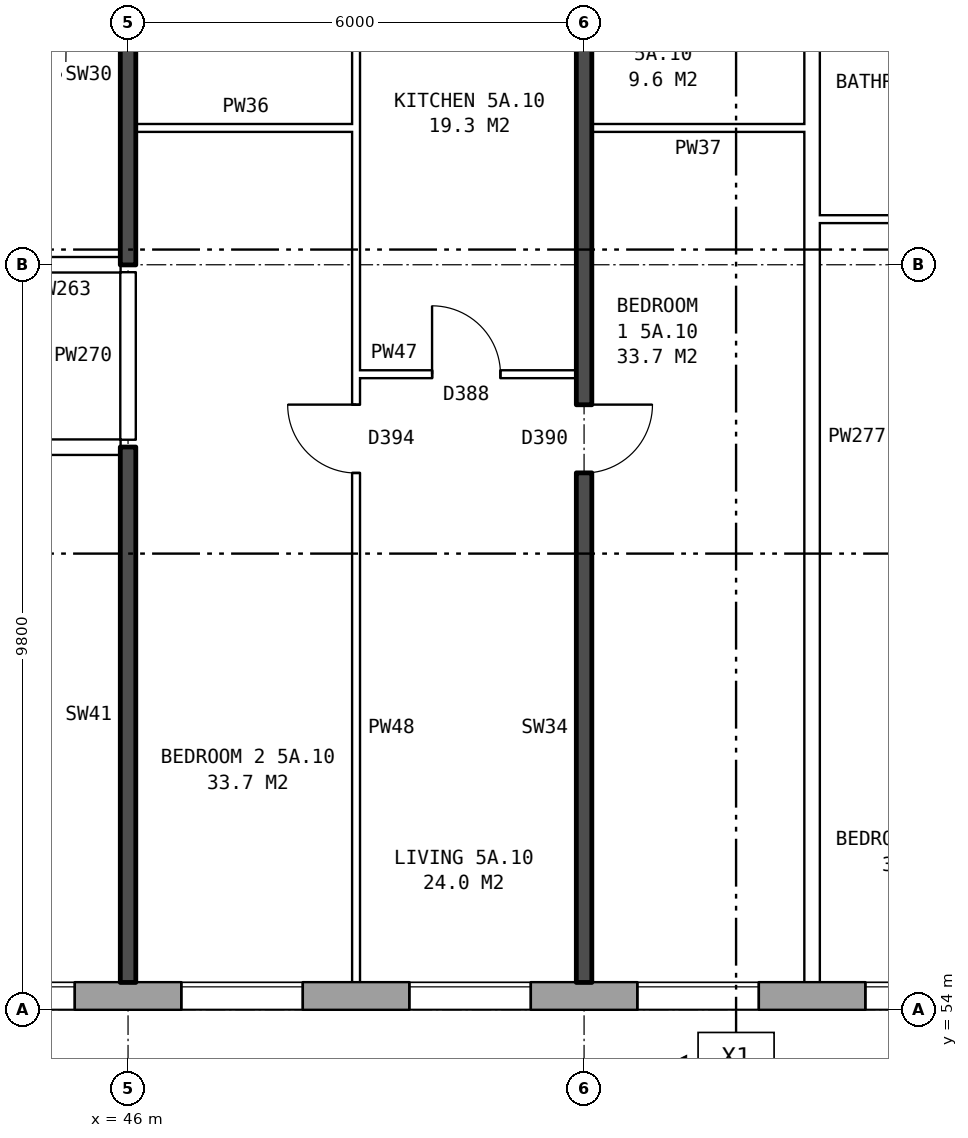
"""IFC4 building model, lengths in metres.
Left out: names, types, materials, properties, quantities, classifications, styles, units other than length and angle.
Written with IfcOpenShell. Run it as: python <this file> out.ifc"""

import sys

from ifc_helpers import new_model, si_unit, direction, frame, frame_2d, origin, place, context, subcontext, project, spatial, rectangle, extrude, element, fill, save


model = new_model("IFC4")
c1 = context("Model", 3, precision=1e-05, world=origin(), true_north=direction((0.0, 1.0)))
c2 = subcontext(c1, "Body", "Model", "MODEL_VIEW")
j1 = project(units=[si_unit("LENGTHUNIT", "METRE"), si_unit("PLANEANGLEUNIT", "RADIAN")], contexts=[c1])
p1 = place(None, origin())
s1 = spatial("IfcSite", under=j1, at=p1, CompositionType="ELEMENT")
p2 = place(p1, origin())
s2 = spatial("IfcBuilding", under=s1, at=p2, CompositionType="ELEMENT")
p3 = place(p2, frame((0.0, 0.0, 22.6)))
s3 = spatial("IfcBuildingStorey", under=s2, at=p3, CompositionType="ELEMENT", Elevation=22.6)
p4 = place(p3, frame((22.825, 54.18, 0.0), z_axis=(0.0, 0.0, 1.0), x_axis=(1.0, 0.0, 0.0)))
e1 = element("IfcWall", 1, at=p4, inside=s3, PredefinedType="STANDARD", context=c2, shape_type="SweptSolid", body=[
    extrude(rectangle(XDim=50.101, YDim=0.36, at=frame_2d((25.05, 0.0))), origin(), (0.0, 0.0, 1.0), 2.85),
])
p5 = place(p4, frame((0.3, 0.0, 0.8)))
e2 = element("IfcOpeningElement", 2, at=p5, cuts=e1, PredefinedType="OPENING", context=c2, shape_type="SweptSolid", body=[
    extrude(rectangle(XDim=1.4, YDim=1.8, at=frame_2d((0.7, 0.9))), frame((0.0, 0.19, 0.0), z_axis=(0.0, -1.0, 0.0), x_axis=(1.0, 0.0, 0.0)), (0.0, 0.0, 1.0), 0.38),
])
p6 = place(p4, frame((5.475, 0.0, 0.8)))
e3 = element("IfcOpeningElement", 3, at=p6, cuts=e1, PredefinedType="OPENING", context=c2, shape_type="SweptSolid", body=[
    extrude(rectangle(XDim=1.2, YDim=0.9, at=frame_2d((0.6, 0.45))), frame((0.0, 0.19, 0.0), z_axis=(0.0, -1.0, 0.0), x_axis=(1.0, 0.0, 0.0)), (0.0, 0.0, 1.0), 0.38),
])
p7 = place(p4, frame((8.875, 0.0, 0.8)))
e4 = element("IfcOpeningElement", 4, at=p7, cuts=e1, PredefinedType="OPENING", context=c2, shape_type="SweptSolid", body=[
    extrude(rectangle(XDim=1.6, YDim=1.8, at=frame_2d((0.8, 0.9))), frame((0.0, 0.19, 0.0), z_axis=(0.0, -1.0, 0.0), x_axis=(1.0, 0.0, 0.0)), (0.0, 0.0, 1.0), 0.38),
])
p8 = place(p4, frame((11.875, 0.0, 0.8)))
e5 = element("IfcOpeningElement", 5, at=p8, cuts=e1, PredefinedType="OPENING", context=c2, shape_type="SweptSolid", body=[
    extrude(rectangle(XDim=1.6, YDim=1.8, at=frame_2d((0.8, 0.9))), frame((0.0, 0.19, 0.0), z_axis=(0.0, -1.0, 0.0), x_axis=(1.0, 0.0, 0.0)), (0.0, 0.0, 1.0), 0.38),
])
p9 = place(p4, frame((14.875, 0.0, 0.8)))
e6 = element("IfcOpeningElement", 6, at=p9, cuts=e1, PredefinedType="OPENING", context=c2, shape_type="SweptSolid", body=[
    extrude(rectangle(XDim=1.6, YDim=1.8, at=frame_2d((0.8, 0.9))), frame((0.0, 0.19, 0.0), z_axis=(0.0, -1.0, 0.0), x_axis=(1.0, 0.0, 0.0)), (0.0, 0.0, 1.0), 0.38),
])
p10 = place(p4, frame((17.875, 0.0, 0.8)))
e7 = element("IfcOpeningElement", 7, at=p10, cuts=e1, PredefinedType="OPENING", context=c2, shape_type="SweptSolid", body=[
    extrude(rectangle(XDim=1.6, YDim=1.8, at=frame_2d((0.8, 0.9))), frame((0.0, 0.19, 0.0), z_axis=(0.0, -1.0, 0.0), x_axis=(1.0, 0.0, 0.0)), (0.0, 0.0, 1.0), 0.38),
])
p11 = place(p4, frame((20.875, 0.0, 0.8)))
e8 = element("IfcOpeningElement", 8, at=p11, cuts=e1, PredefinedType="OPENING", context=c2, shape_type="SweptSolid", body=[
    extrude(rectangle(XDim=1.6, YDim=1.8, at=frame_2d((0.8, 0.9))), frame((0.0, 0.19, 0.0), z_axis=(0.0, -1.0, 0.0), x_axis=(1.0, 0.0, 0.0)), (0.0, 0.0, 1.0), 0.38),
])
p12 = place(p4, frame((23.875, 0.0, 0.8)))
e9 = element("IfcOpeningElement", 9, at=p12, cuts=e1, PredefinedType="OPENING", context=c2, shape_type="SweptSolid", body=[
    extrude(rectangle(XDim=1.6, YDim=1.8, at=frame_2d((0.8, 0.9))), frame((0.0, 0.19, 0.0), z_axis=(0.0, -1.0, 0.0), x_axis=(1.0, 0.0, 0.0)), (0.0, 0.0, 1.0), 0.38),
])
p13 = place(p4, frame((26.875, 0.0, 0.8)))
e10 = element("IfcOpeningElement", 10, at=p13, cuts=e1, PredefinedType="OPENING", context=c2, shape_type="SweptSolid", body=[
    extrude(rectangle(XDim=1.6, YDim=1.8, at=frame_2d((0.8, 0.9))), frame((0.0, 0.19, 0.0), z_axis=(0.0, -1.0, 0.0), x_axis=(1.0, 0.0, 0.0)), (0.0, 0.0, 1.0), 0.38),
])
p14 = place(p4, frame((29.875, 0.0, 0.8)))
e11 = element("IfcOpeningElement", 11, at=p14, cuts=e1, PredefinedType="OPENING", context=c2, shape_type="SweptSolid", body=[
    extrude(rectangle(XDim=1.6, YDim=1.8, at=frame_2d((0.8, 0.9))), frame((0.0, 0.19, 0.0), z_axis=(0.0, -1.0, 0.0), x_axis=(1.0, 0.0, 0.0)), (0.0, 0.0, 1.0), 0.38),
])
p15 = place(p4, frame((32.875, 0.0, 0.8)))
e12 = element("IfcOpeningElement", 12, at=p15, cuts=e1, PredefinedType="OPENING", context=c2, shape_type="SweptSolid", body=[
    extrude(rectangle(XDim=1.6, YDim=1.8, at=frame_2d((0.8, 0.9))), frame((0.0, 0.19, 0.0), z_axis=(0.0, -1.0, 0.0), x_axis=(1.0, 0.0, 0.0)), (0.0, 0.0, 1.0), 0.38),
])
p16 = place(p4, frame((35.875, 0.0, 0.8)))
e13 = element("IfcOpeningElement", 13, at=p16, cuts=e1, PredefinedType="OPENING", context=c2, shape_type="SweptSolid", body=[
    extrude(rectangle(XDim=1.6, YDim=1.8, at=frame_2d((0.8, 0.9))), frame((0.0, 0.19, 0.0), z_axis=(0.0, -1.0, 0.0), x_axis=(1.0, 0.0, 0.0)), (0.0, 0.0, 1.0), 0.38),
])
p17 = place(p4, frame((38.875, 0.0, 0.8)))
e14 = element("IfcOpeningElement", 14, at=p17, cuts=e1, PredefinedType="OPENING", context=c2, shape_type="SweptSolid", body=[
    extrude(rectangle(XDim=1.6, YDim=1.8, at=frame_2d((0.8, 0.9))), frame((0.0, 0.19, 0.0), z_axis=(0.0, -1.0, 0.0), x_axis=(1.0, 0.0, 0.0)), (0.0, 0.0, 1.0), 0.38),
])
p18 = place(p4, frame((41.875, 0.0, 0.8)))
e15 = element("IfcOpeningElement", 15, at=p18, cuts=e1, PredefinedType="OPENING", context=c2, shape_type="SweptSolid", body=[
    extrude(rectangle(XDim=1.6, YDim=1.8, at=frame_2d((0.8, 0.9))), frame((0.0, 0.19, 0.0), z_axis=(0.0, -1.0, 0.0), x_axis=(1.0, 0.0, 0.0)), (0.0, 0.0, 1.0), 0.38),
])
p19 = place(p4, frame((43.775, 0.0, 0.8)))
e16 = element("IfcOpeningElement", 16, at=p19, cuts=e1, PredefinedType="OPENING", context=c2, shape_type="SweptSolid", body=[
    extrude(rectangle(XDim=0.8, YDim=0.9, at=frame_2d((0.4, 0.45))), frame((0.0, 0.19, 0.0), z_axis=(0.0, -1.0, 0.0), x_axis=(1.0, 0.0, 0.0)), (0.0, 0.0, 1.0), 0.38),
])
p20 = place(p4, frame((47.875, 0.0, 0.8)))
e17 = element("IfcOpeningElement", 17, at=p20, cuts=e1, PredefinedType="OPENING", context=c2, shape_type="SweptSolid", body=[
    extrude(rectangle(XDim=1.6, YDim=1.8, at=frame_2d((0.8, 0.9))), frame((0.0, 0.19, 0.0), z_axis=(0.0, -1.0, 0.0), x_axis=(1.0, 0.0, 0.0)), (0.0, 0.0, 1.0), 0.38),
])
p21 = place(p4, frame((2.0, 0.0, 0.9)))
e18 = element("IfcOpeningElement", 18, at=p21, cuts=e1, PredefinedType="OPENING", context=c2, shape_type="SweptSolid", body=[
    extrude(rectangle(XDim=0.8, YDim=1.5, at=frame_2d((0.4, 0.75))), frame((0.0, 0.19, 0.0), z_axis=(0.0, -1.0, 0.0), x_axis=(1.0, 0.0, 0.0)), (0.0, 0.0, 1.0), 0.38),
])
p22 = place(p4, frame((6.975, 0.0, 0.8)))
e19 = element("IfcOpeningElement", 19, at=p22, cuts=e1, PredefinedType="OPENING", context=c2, shape_type="SweptSolid", body=[
    extrude(rectangle(XDim=1.4, YDim=1.8, at=frame_2d((0.7, 0.9))), frame((0.0, 0.19, 0.0), z_axis=(0.0, -1.0, 0.0), x_axis=(1.0, 0.0, 0.0)), (0.0, 0.0, 1.0), 0.38),
])
p23 = place(p4, frame((46.075, 0.0, 1.7)))
e20 = element("IfcOpeningElement", 20, at=p23, cuts=e1, PredefinedType="OPENING", context=c2, shape_type="SweptSolid", body=[
    extrude(rectangle(XDim=0.8, YDim=0.9, at=frame_2d((0.4, 0.45))), frame((0.0, 0.19, 0.0), z_axis=(0.0, -1.0, 0.0), x_axis=(1.0, 0.0, 0.0)), (0.0, 0.0, 1.0), 0.38),
])
p24 = place(p3, frame((20.11, 61.4, 0.0), z_axis=(0.0, 0.0, 1.0), x_axis=(1.0, 0.0, 0.0)))
e21 = element("IfcWall", 21, at=p24, inside=s3, PredefinedType="PARTITIONING", context=c2, shape_type="SweptSolid", body=[
    extrude(rectangle(XDim=25.79, YDim=0.2, at=frame_2d((12.895, 0.0))), origin(), (0.0, 0.0, 1.0), 2.85),
])
p25 = place(p24, frame((22.34, 0.0, 0.0)))
e22 = element("IfcOpeningElement", 22, at=p25, cuts=e21, PredefinedType="OPENING", context=c2, shape_type="SweptSolid", body=[
    extrude(rectangle(XDim=1.0, YDim=2.1, at=frame_2d((0.5, 1.05))), frame((0.0, 0.11, 0.0), z_axis=(0.0, -1.0, 0.0), x_axis=(1.0, 0.0, 0.0)), (0.0, 0.0, 1.0), 0.22),
])
p26 = place(p24, frame((10.39, 0.0, 0.0)))
e23 = element("IfcOpeningElement", 23, at=p26, cuts=e21, PredefinedType="OPENING", context=c2, shape_type="SweptSolid", body=[
    extrude(rectangle(XDim=1.0, YDim=2.1, at=frame_2d((0.5, 1.05))), frame((0.0, 0.11, 0.0), z_axis=(0.0, -1.0, 0.0), x_axis=(1.0, 0.0, 0.0)), (0.0, 0.0, 1.0), 0.22),
])
p27 = place(p24, frame((2.245, 0.0, 0.0)))
e24 = element("IfcOpeningElement", 24, at=p27, cuts=e21, PredefinedType="OPENING", context=c2, shape_type="SweptSolid", body=[
    extrude(rectangle(XDim=1.0, YDim=2.1, at=frame_2d((0.5, 1.05))), frame((0.0, 0.11, 0.0), z_axis=(0.0, -1.0, 0.0), x_axis=(1.0, 0.0, 0.0)), (0.0, 0.0, 1.0), 0.22),
])
p28 = place(p3, frame((49.0, 62.36, 0.0), z_axis=(0.0, 0.0, 1.0), x_axis=(1.0, 0.0, 0.0)))
e25 = element("IfcWall", 25, at=p28, inside=s3, PredefinedType="PARTITIONING", context=c2, shape_type="SweptSolid", body=[
    extrude(rectangle(XDim=2.9, YDim=0.1, at=frame_2d((1.45, 0.0))), origin(), (0.0, 0.0, 1.0), 2.85),
])
p29 = place(p28, frame((1.0, 0.0, 0.0)))
e26 = element("IfcOpeningElement", 26, at=p29, cuts=e25, PredefinedType="OPENING", context=c2, shape_type="SweptSolid", body=[
    extrude(rectangle(XDim=0.9, YDim=2.1, at=frame_2d((0.45, 1.05))), frame((0.0, 0.06, 0.0), z_axis=(0.0, -1.0, 0.0), x_axis=(1.0, 0.0, 0.0)), (0.0, 0.0, 1.0), 0.12),
])
p30 = place(p3, frame((44.36, 63.8, 0.0), z_axis=(0.0, 0.0, 1.0), x_axis=(1.0, 0.0, 0.0)))
e27 = element("IfcWall", 27, at=p30, inside=s3, PredefinedType="PARTITIONING", context=c2, shape_type="SweptSolid", body=[
    extrude(rectangle(XDim=1.54, YDim=0.2, at=frame_2d((0.77, 0.0))), origin(), (0.0, 0.0, 1.0), 2.85),
])
p31 = place(p3, frame((55.1, 64.4, 0.0), z_axis=(0.0, 0.0, 1.0), x_axis=(1.0, 0.0, 0.0)))
e28 = element("IfcWall", 28, at=p31, inside=s3, PredefinedType="PARTITIONING", context=c2, shape_type="SweptSolid", body=[
    extrude(rectangle(XDim=2.8, YDim=0.1, at=frame_2d((1.4, 0.0))), origin(), (0.0, 0.0, 1.0), 2.85),
])
p32 = place(p3, frame((46.1, 65.6, 0.0), z_axis=(0.0, 0.0, 1.0), x_axis=(1.0, 0.0, 0.0)))
e29 = element("IfcWall", 29, at=p32, inside=s3, PredefinedType="PARTITIONING", context=c2, shape_type="SweptSolid", body=[
    extrude(rectangle(XDim=2.9, YDim=0.1, at=frame_2d((1.45, 0.0))), origin(), (0.0, 0.0, 1.0), 2.85),
])
p33 = place(p3, frame((52.1, 65.6, 0.0), z_axis=(0.0, 0.0, 1.0), x_axis=(1.0, 0.0, 0.0)))
e30 = element("IfcWall", 30, at=p33, inside=s3, PredefinedType="PARTITIONING", context=c2, shape_type="SweptSolid", body=[
    extrude(rectangle(XDim=2.8, YDim=0.1, at=frame_2d((1.4, 0.0))), origin(), (0.0, 0.0, 1.0), 2.85),
])
p34 = place(p3, frame((46.0, 54.36, 0.0), z_axis=(0.0, 0.0, 1.0), x_axis=(0.0, 1.0, 0.0)))
e31 = element("IfcWall", 31, at=p34, inside=s3, PredefinedType="SOLIDWALL", context=c2, shape_type="SweptSolid", body=[
    extrude(rectangle(XDim=7.04, YDim=0.2, at=frame_2d((3.52, 0.0))), origin(), (0.0, 0.0, 1.0), 2.85),
])
p35 = place(p3, frame((46.0, 61.5, 0.0), z_axis=(0.0, 0.0, 1.0), x_axis=(0.0, 1.0, 0.0)))
e32 = element("IfcWall", 32, at=p35, inside=s3, PredefinedType="PARTITIONING", context=c2, shape_type="SweptSolid", body=[
    extrude(rectangle(XDim=2.2, YDim=0.2, at=frame_2d((1.1, 0.0))), origin(), (0.0, 0.0, 1.0), 2.85),
])
p36 = place(p3, frame((46.0, 63.8, 0.0), z_axis=(0.0, 0.0, 1.0), x_axis=(0.0, 1.0, 0.0)))
e33 = element("IfcWall", 33, at=p36, inside=s3, PredefinedType="SOLIDWALL", context=c2, shape_type="SweptSolid", body=[
    extrude(rectangle(XDim=5.0, YDim=0.2, at=frame_2d((2.5, 0.0))), origin(), (0.0, 0.0, 1.0), 2.85),
])
p37 = place(p3, frame((49.0, 54.36, 0.0), z_axis=(0.0, 0.0, 1.0), x_axis=(0.0, 1.0, 0.0)))
e34 = element("IfcWall", 34, at=p37, inside=s3, PredefinedType="PARTITIONING", context=c2, shape_type="SweptSolid", body=[
    extrude(rectangle(XDim=14.34, YDim=0.1, at=frame_2d((7.17, 0.0))), origin(), (0.0, 0.0, 1.0), 2.85),
])
p38 = place(p37, frame((6.7, 0.0, 0.0)))
e35 = element("IfcOpeningElement", 35, at=p38, cuts=e34, PredefinedType="OPENING", context=c2, shape_type="SweptSolid", body=[
    extrude(rectangle(XDim=0.9, YDim=2.1, at=frame_2d((0.45, 1.05))), frame((0.0, 0.06, 0.0), z_axis=(0.0, -1.0, 0.0), x_axis=(1.0, 0.0, 0.0)), (0.0, 0.0, 1.0), 0.12),
])
p39 = place(p37, frame((13.04, 0.0, 0.0)))
e36 = element("IfcOpeningElement", 36, at=p39, cuts=e34, PredefinedType="OPENING", context=c2, shape_type="SweptSolid", body=[
    extrude(rectangle(XDim=0.9, YDim=2.1, at=frame_2d((0.45, 1.05))), frame((0.0, 0.06, 0.0), z_axis=(0.0, -1.0, 0.0), x_axis=(1.0, 0.0, 0.0)), (0.0, 0.0, 1.0), 0.12),
])
p40 = place(p3, frame((52.0, 54.36, 0.0), z_axis=(0.0, 0.0, 1.0), x_axis=(0.0, 1.0, 0.0)))
e37 = element("IfcWall", 37, at=p40, inside=s3, PredefinedType="SOLIDWALL", context=c2, shape_type="SweptSolid", body=[
    extrude(rectangle(XDim=14.44, YDim=0.2, at=frame_2d((7.22, 0.0))), origin(), (0.0, 0.0, 1.0), 2.85),
])
p41 = place(p40, frame((6.7, 0.0, 0.0)))
e38 = element("IfcOpeningElement", 38, at=p41, cuts=e37, PredefinedType="OPENING", context=c2, shape_type="SweptSolid", body=[
    extrude(rectangle(XDim=0.9, YDim=2.1, at=frame_2d((0.45, 1.05))), frame((0.0, 0.11, 0.0), z_axis=(0.0, -1.0, 0.0), x_axis=(1.0, 0.0, 0.0)), (0.0, 0.0, 1.0), 0.22),
])
p42 = place(p40, frame((13.14, 0.0, 0.0)))
e39 = element("IfcOpeningElement", 39, at=p42, cuts=e37, PredefinedType="OPENING", context=c2, shape_type="SweptSolid", body=[
    extrude(rectangle(XDim=0.9, YDim=2.1, at=frame_2d((0.45, 1.05))), frame((0.0, 0.11, 0.0), z_axis=(0.0, -1.0, 0.0), x_axis=(1.0, 0.0, 0.0)), (0.0, 0.0, 1.0), 0.22),
])
p43 = place(p3, frame((55.0, 54.36, 0.0), z_axis=(0.0, 0.0, 1.0), x_axis=(0.0, 1.0, 0.0)))
e40 = element("IfcWall", 40, at=p43, inside=s3, PredefinedType="PARTITIONING", context=c2, shape_type="SweptSolid", body=[
    extrude(rectangle(XDim=14.34, YDim=0.2, at=frame_2d((7.17, 0.0))), origin(), (0.0, 0.0, 1.0), 2.85),
])
p44 = place(p11, origin())
e41 = element("IfcWindow", 41, at=p44, inside=s3, PartitioningType="SINGLE_PANEL", PredefinedType="WINDOW", context=c2, shape_type="SweptSolid", body=[
    extrude(rectangle(XDim=1.6, YDim=1.8, at=frame_2d((0.8, 0.9))), frame((0.0, 0.15, 0.0), z_axis=(0.0, -1.0, 0.0), x_axis=(1.0, 0.0, 0.0)), (0.0, 0.0, 1.0), 0.06),
])
fill(e8, e41)
p45 = place(p12, origin())
e42 = element("IfcWindow", 42, at=p45, inside=s3, PartitioningType="SINGLE_PANEL", PredefinedType="WINDOW", context=c2, shape_type="SweptSolid", body=[
    extrude(rectangle(XDim=1.6, YDim=1.8, at=frame_2d((0.8, 0.9))), frame((0.0, 0.15, 0.0), z_axis=(0.0, -1.0, 0.0), x_axis=(1.0, 0.0, 0.0)), (0.0, 0.0, 1.0), 0.06),
])
fill(e9, e42)
p46 = place(p13, origin())
e43 = element("IfcWindow", 43, at=p46, inside=s3, PartitioningType="SINGLE_PANEL", PredefinedType="WINDOW", context=c2, shape_type="SweptSolid", body=[
    extrude(rectangle(XDim=1.6, YDim=1.8, at=frame_2d((0.8, 0.9))), frame((0.0, 0.15, 0.0), z_axis=(0.0, -1.0, 0.0), x_axis=(1.0, 0.0, 0.0)), (0.0, 0.0, 1.0), 0.06),
])
fill(e10, e43)
p47 = place(p14, origin())
e44 = element("IfcWindow", 44, at=p47, inside=s3, PartitioningType="SINGLE_PANEL", PredefinedType="WINDOW", context=c2, shape_type="SweptSolid", body=[
    extrude(rectangle(XDim=1.6, YDim=1.8, at=frame_2d((0.8, 0.9))), frame((0.0, 0.15, 0.0), z_axis=(0.0, -1.0, 0.0), x_axis=(1.0, 0.0, 0.0)), (0.0, 0.0, 1.0), 0.06),
])
fill(e11, e44)
p48 = place(p15, origin())
e45 = element("IfcWindow", 45, at=p48, inside=s3, PartitioningType="SINGLE_PANEL", PredefinedType="WINDOW", context=c2, shape_type="SweptSolid", body=[
    extrude(rectangle(XDim=1.6, YDim=1.8, at=frame_2d((0.8, 0.9))), frame((0.0, 0.15, 0.0), z_axis=(0.0, -1.0, 0.0), x_axis=(1.0, 0.0, 0.0)), (0.0, 0.0, 1.0), 0.06),
])
fill(e12, e45)
p49 = place(p41, frame((0.9, 0.0, 0.0), z_axis=(0.0, 0.0, 1.0), x_axis=(-1.0, 0.0, 0.0)))
e46 = element("IfcDoor", 46, at=p49, inside=s3, OperationType="SINGLE_SWING_LEFT", PredefinedType="DOOR", context=c2, shape_type="SweptSolid", body=[
    extrude(rectangle(XDim=0.9, YDim=2.1, at=frame_2d((0.45, 1.05))), frame((0.0, 0.025, 0.0), z_axis=(0.0, -1.0, 0.0), x_axis=(1.0, 0.0, 0.0)), (0.0, 0.0, 1.0), 0.05),
])
fill(e38, e46)
p50 = place(p38, origin())
e47 = element("IfcDoor", 47, at=p50, inside=s3, OperationType="SINGLE_SWING_RIGHT", PredefinedType="DOOR", context=c2, shape_type="SweptSolid", body=[
    extrude(rectangle(XDim=0.9, YDim=2.1, at=frame_2d((0.45, 1.05))), frame((0.0, 0.025, 0.0), z_axis=(0.0, -1.0, 0.0), x_axis=(1.0, 0.0, 0.0)), (0.0, 0.0, 1.0), 0.05),
])
fill(e35, e47)
p51 = place(p29, origin())
e48 = element("IfcDoor", 48, at=p51, inside=s3, OperationType="SINGLE_SWING_LEFT", PredefinedType="DOOR", context=c2, shape_type="SweptSolid", body=[
    extrude(rectangle(XDim=0.9, YDim=2.1, at=frame_2d((0.45, 1.05))), frame((0.0, 0.025, 0.0), z_axis=(0.0, -1.0, 0.0), x_axis=(1.0, 0.0, 0.0)), (0.0, 0.0, 1.0), 0.05),
])
fill(e26, e48)
save(model, sys.argv[1])
